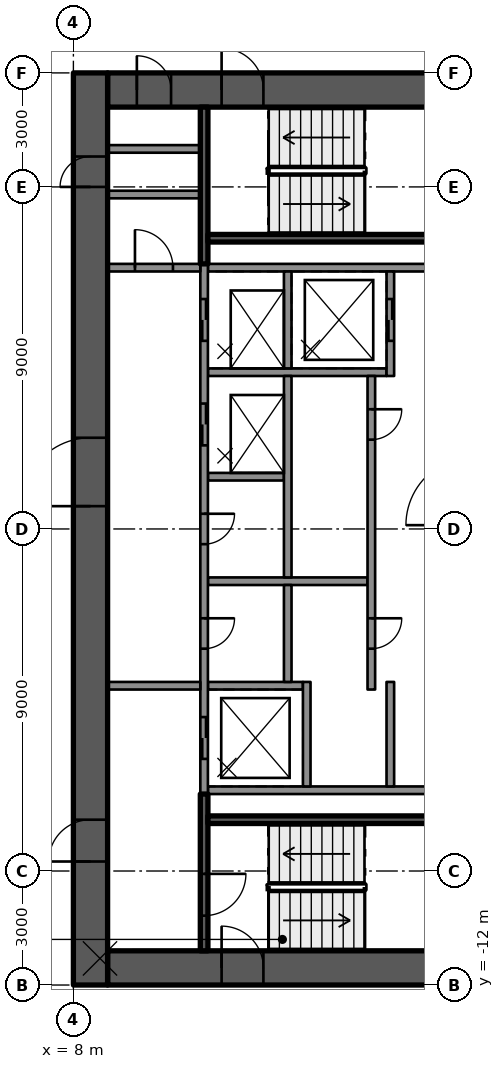
"""IFC4 building model, lengths in metres.
Left out: names, types, materials, properties, quantities, classifications, styles, units other than length and angle.
Written with IfcOpenShell. Run it as: python <this file> out.ifc"""

import sys

from ifc_helpers import new_model, si_unit, direction, frame, frame_2d, origin, place, context, subcontext, project, spatial, rectangle, extrude, element, fill, save


model = new_model("IFC4")
c1 = context("Model", 3, precision=1e-05, world=origin(), true_north=direction((0.0, 1.0)))
c2 = subcontext(c1, "Body", "Model", "MODEL_VIEW")
j1 = project(units=[si_unit("LENGTHUNIT", "METRE"), si_unit("PLANEANGLEUNIT", "RADIAN")], contexts=[c1])
p1 = place(None, origin())
s1 = spatial("IfcSite", under=j1, at=p1, CompositionType="ELEMENT")
p2 = place(p1, origin())
s2 = spatial("IfcBuilding", under=s1, at=p2, CompositionType="ELEMENT")
p3 = place(p2, frame((0.0, 0.0, 275.4)))
s3 = spatial("IfcBuildingStorey", under=s2, at=p3, CompositionType="ELEMENT", Elevation=275.4)
p4 = place(p3, frame((8.9, 11.55, 0.0), z_axis=(0.0, 0.0, 1.0), x_axis=(1.0, 0.0, 0.0)))
e1 = element("IfcWall", 1, at=p4, inside=s3, PredefinedType="SHEAR", context=c2, shape_type="SweptSolid", body=[
    extrude(rectangle(XDim=9.2, YDim=0.9, at=frame_2d((4.6, 0.0))), origin(), (0.0, 0.0, 1.0), 3.5),
])
p5 = place(p4, frame((3.0, 0.0, 0.0)))
e2 = element("IfcOpeningElement", 2, at=p5, cuts=e1, PredefinedType="OPENING", context=c2, shape_type="SweptSolid", body=[
    extrude(rectangle(XDim=1.1, YDim=2.1, at=frame_2d((0.55, 1.05))), frame((0.0, 0.46, 0.0), z_axis=(0.0, -1.0, 0.0), x_axis=(1.0, 0.0, 0.0)), (0.0, 0.0, 1.0), 0.92),
])
p6 = place(p4, frame((0.77, 0.0, 0.0)))
e3 = element("IfcOpeningElement", 3, at=p6, cuts=e1, PredefinedType="OPENING", context=c2, shape_type="SweptSolid", body=[
    extrude(rectangle(XDim=0.9, YDim=2.1, at=frame_2d((0.45, 1.05))), frame((0.0, 0.46, 0.0), z_axis=(0.0, -1.0, 0.0), x_axis=(1.0, 0.0, 0.0)), (0.0, 0.0, 1.0), 0.92),
])
p7 = place(p3, frame((8.9, -11.55, 0.0), z_axis=(0.0, 0.0, 1.0), x_axis=(1.0, 0.0, 0.0)))
e4 = element("IfcWall", 4, at=p7, inside=s3, PredefinedType="SHEAR", context=c2, shape_type="SweptSolid", body=[
    extrude(rectangle(XDim=9.2, YDim=0.9, at=frame_2d((4.6, 0.0))), origin(), (0.0, 0.0, 1.0), 3.5),
])
p8 = place(p7, frame((3.0, 0.0, 0.0)))
e5 = element("IfcOpeningElement", 5, at=p8, cuts=e4, PredefinedType="OPENING", context=c2, shape_type="SweptSolid", body=[
    extrude(rectangle(XDim=1.1, YDim=2.1, at=frame_2d((0.55, 1.05))), frame((0.0, 0.46, 0.0), z_axis=(0.0, -1.0, 0.0), x_axis=(1.0, 0.0, 0.0)), (0.0, 0.0, 1.0), 0.92),
])
p9 = place(p3, frame((8.45, -12.0, 0.0), z_axis=(0.0, 0.0, 1.0), x_axis=(0.0, 1.0, 0.0)))
e6 = element("IfcWall", 6, at=p9, inside=s3, PredefinedType="SHEAR", context=c2, shape_type="SweptSolid", body=[
    extrude(rectangle(XDim=24.0, YDim=0.9, at=frame_2d((12.0, 0.0))), origin(), (0.0, 0.0, 1.0), 3.5),
])
p10 = place(p9, frame((12.6, 0.0, 0.0)))
e7 = element("IfcOpeningElement", 7, at=p10, cuts=e6, PredefinedType="OPENING", context=c2, shape_type="SweptSolid", body=[
    extrude(rectangle(XDim=1.8, YDim=2.1, at=frame_2d((0.9, 1.05))), frame((0.0, 0.46, 0.0), z_axis=(0.0, -1.0, 0.0), x_axis=(1.0, 0.0, 0.0)), (0.0, 0.0, 1.0), 0.92),
])
p11 = place(p9, frame((3.25, 0.0, 0.0)))
e8 = element("IfcOpeningElement", 8, at=p11, cuts=e6, PredefinedType="OPENING", context=c2, shape_type="SweptSolid", body=[
    extrude(rectangle(XDim=1.1, YDim=2.1, at=frame_2d((0.55, 1.05))), frame((0.0, 0.46, 0.0), z_axis=(0.0, -1.0, 0.0), x_axis=(1.0, 0.0, 0.0)), (0.0, 0.0, 1.0), 0.92),
])
p12 = place(p9, frame((21.0, 0.0, 0.0)))
e9 = element("IfcOpeningElement", 9, at=p12, cuts=e6, PredefinedType="OPENING", context=c2, shape_type="SweptSolid", body=[
    extrude(rectangle(XDim=0.8, YDim=2.1, at=frame_2d((0.4, 1.05))), frame((0.0, 0.46, 0.0), z_axis=(0.0, -1.0, 0.0), x_axis=(1.0, 0.0, 0.0)), (0.0, 0.0, 1.0), 0.92),
])
for number, where, z_axis, x_axis in (
    (10, (11.54, -6.875, 0.0), (0.0, 0.0, 1.0), (1.0, 0.0, 0.0)),
    (11, (11.54, 6.875, 0.0), (0.0, 0.0, 1.0), (1.0, 0.0, 0.0)),
):
    element("IfcWall", number, at=place(p3, frame(where, z_axis=z_axis, x_axis=x_axis)), inside=s3, PredefinedType="SOLIDWALL", context=c2, shape_type="SweptSolid", body=[
        extrude(rectangle(XDim=6.56, YDim=0.2, at=frame_2d((3.28, 0.0))), origin(), (0.0, 0.0, 1.0), 3.09),
    ])
p13 = place(p3, frame((11.54, 4.125, 0.0), z_axis=(0.0, 0.0, 1.0), x_axis=(1.0, 0.0, 0.0)))
e12 = element("IfcWall", 12, at=p13, inside=s3, PredefinedType="SOLIDWALL", context=c2, shape_type="SweptSolid", body=[
    extrude(rectangle(XDim=4.7, YDim=0.2, at=frame_2d((2.35, 0.0))), origin(), (0.0, 0.0, 1.0), 3.09),
])
p14 = place(p3, frame((11.54, 1.375, 0.0), z_axis=(0.0, 0.0, 1.0), x_axis=(1.0, 0.0, 0.0)))
e13 = element("IfcWall", 13, at=p14, inside=s3, PredefinedType="SOLIDWALL", context=c2, shape_type="SweptSolid", body=[
    extrude(rectangle(XDim=2.0, YDim=0.2, at=frame_2d((1.0, 0.0))), origin(), (0.0, 0.0, 1.0), 3.09),
])
p15 = place(p3, frame((11.54, -1.375, 0.0), z_axis=(0.0, 0.0, 1.0), x_axis=(1.0, 0.0, 0.0)))
e14 = element("IfcWall", 14, at=p15, inside=s3, PredefinedType="SOLIDWALL", context=c2, shape_type="SweptSolid", body=[
    extrude(rectangle(XDim=4.2, YDim=0.2, at=frame_2d((2.1, 0.0))), origin(), (0.0, 0.0, 1.0), 3.09),
])
p16 = place(p3, frame((11.54, -4.125, 0.0), z_axis=(0.0, 0.0, 1.0), x_axis=(1.0, 0.0, 0.0)))
e15 = element("IfcWall", 15, at=p16, inside=s3, PredefinedType="SOLIDWALL", context=c2, shape_type="SweptSolid", body=[
    extrude(rectangle(XDim=2.5, YDim=0.2, at=frame_2d((1.25, 0.0))), origin(), (0.0, 0.0, 1.0), 3.09),
])
p17 = place(p3, frame((11.44, 6.975, 0.0), z_axis=(0.0, 0.0, 1.0), x_axis=(0.0, -1.0, 0.0)))
e16 = element("IfcWall", 16, at=p17, inside=s3, PredefinedType="SOLIDWALL", context=c2, shape_type="SweptSolid", body=[
    extrude(rectangle(XDim=13.95, YDim=0.2, at=frame_2d((6.975, 0.0))), origin(), (0.0, 0.0, 1.0), 3.09),
])
p18 = place(p17, frame((0.925, 0.0, 0.0)))
e17 = element("IfcOpeningElement", 17, at=p18, cuts=e16, PredefinedType="OPENING", context=c2, shape_type="SweptSolid", body=[
    extrude(rectangle(XDim=1.1, YDim=2.1, at=frame_2d((0.55, 1.05))), frame((0.0, 0.11, 0.0), z_axis=(0.0, -1.0, 0.0), x_axis=(1.0, 0.0, 0.0)), (0.0, 0.0, 1.0), 0.22),
])
p19 = place(p17, frame((3.675, 0.0, 0.0)))
e18 = element("IfcOpeningElement", 18, at=p19, cuts=e16, PredefinedType="OPENING", context=c2, shape_type="SweptSolid", body=[
    extrude(rectangle(XDim=1.1, YDim=2.1, at=frame_2d((0.55, 1.05))), frame((0.0, 0.11, 0.0), z_axis=(0.0, -1.0, 0.0), x_axis=(1.0, 0.0, 0.0)), (0.0, 0.0, 1.0), 0.22),
])
p20 = place(p17, frame((11.925, 0.0, 0.0)))
e19 = element("IfcOpeningElement", 19, at=p20, cuts=e16, PredefinedType="OPENING", context=c2, shape_type="SweptSolid", body=[
    extrude(rectangle(XDim=1.1, YDim=2.1, at=frame_2d((0.55, 1.05))), frame((0.0, 0.11, 0.0), z_axis=(0.0, -1.0, 0.0), x_axis=(1.0, 0.0, 0.0)), (0.0, 0.0, 1.0), 0.22),
])
p21 = place(p17, frame((6.575, 0.0, 0.0)))
e20 = element("IfcOpeningElement", 20, at=p21, cuts=e16, PredefinedType="OPENING", context=c2, shape_type="SweptSolid", body=[
    extrude(rectangle(XDim=0.8, YDim=2.1, at=frame_2d((0.4, 1.05))), frame((0.0, 0.11, 0.0), z_axis=(0.0, -1.0, 0.0), x_axis=(1.0, 0.0, 0.0)), (0.0, 0.0, 1.0), 0.22),
])
p22 = place(p17, frame((9.325, 0.0, 0.0)))
e21 = element("IfcOpeningElement", 21, at=p22, cuts=e16, PredefinedType="OPENING", context=c2, shape_type="SweptSolid", body=[
    extrude(rectangle(XDim=0.8, YDim=2.1, at=frame_2d((0.4, 1.05))), frame((0.0, 0.11, 0.0), z_axis=(0.0, -1.0, 0.0), x_axis=(1.0, 0.0, 0.0)), (0.0, 0.0, 1.0), 0.22),
])
p23 = place(p3, frame((13.64, 6.775, 0.0), z_axis=(0.0, 0.0, 1.0), x_axis=(0.0, -1.0, 0.0)))
e22 = element("IfcWall", 22, at=p23, inside=s3, PredefinedType="SOLIDWALL", context=c2, shape_type="SweptSolid", body=[
    extrude(rectangle(XDim=2.55, YDim=0.2, at=frame_2d((1.275, 0.0))), origin(), (0.0, 0.0, 1.0), 3.09),
])
p24 = place(p3, frame((13.64, 4.025, 0.0), z_axis=(0.0, 0.0, 1.0), x_axis=(0.0, -1.0, 0.0)))
e23 = element("IfcWall", 23, at=p24, inside=s3, PredefinedType="SOLIDWALL", context=c2, shape_type="SweptSolid", body=[
    extrude(rectangle(XDim=5.3, YDim=0.2, at=frame_2d((2.65, 0.0))), origin(), (0.0, 0.0, 1.0), 3.09),
])
p25 = place(p3, frame((13.64, -1.475, 0.0), z_axis=(0.0, 0.0, 1.0), x_axis=(0.0, -1.0, 0.0)))
e24 = element("IfcWall", 24, at=p25, inside=s3, PredefinedType="SOLIDWALL", context=c2, shape_type="SweptSolid", body=[
    extrude(rectangle(XDim=2.55, YDim=0.2, at=frame_2d((1.275, 0.0))), origin(), (0.0, 0.0, 1.0), 3.09),
])
p26 = place(p3, frame((14.14, -4.025, 0.0), z_axis=(0.0, 0.0, 1.0), x_axis=(0.0, -1.0, 0.0)))
e25 = element("IfcWall", 25, at=p26, inside=s3, PredefinedType="SOLIDWALL", context=c2, shape_type="SweptSolid", body=[
    extrude(rectangle(XDim=2.75, YDim=0.2, at=frame_2d((1.375, 0.0))), origin(), (0.0, 0.0, 1.0), 3.09),
])
p27 = place(p3, frame((16.34, 6.775, 0.0), z_axis=(0.0, 0.0, 1.0), x_axis=(0.0, -1.0, 0.0)))
e26 = element("IfcWall", 26, at=p27, inside=s3, PredefinedType="SOLIDWALL", context=c2, shape_type="SweptSolid", body=[
    extrude(rectangle(XDim=2.75, YDim=0.2, at=frame_2d((1.375, 0.0))), origin(), (0.0, 0.0, 1.0), 3.09),
])
p28 = place(p27, frame((0.725, 0.0, 0.0)))
e27 = element("IfcOpeningElement", 27, at=p28, cuts=e26, PredefinedType="OPENING", context=c2, shape_type="SweptSolid", body=[
    extrude(rectangle(XDim=1.1, YDim=2.1, at=frame_2d((0.55, 1.05))), frame((0.0, 0.11, 0.0), z_axis=(0.0, -1.0, 0.0), x_axis=(1.0, 0.0, 0.0)), (0.0, 0.0, 1.0), 0.22),
])
p29 = place(p3, frame((15.84, 4.025, 0.0), z_axis=(0.0, 0.0, 1.0), x_axis=(0.0, -1.0, 0.0)))
e28 = element("IfcWall", 28, at=p29, inside=s3, PredefinedType="SOLIDWALL", context=c2, shape_type="SweptSolid", body=[
    extrude(rectangle(XDim=8.25, YDim=0.2, at=frame_2d((4.125, 0.0))), origin(), (0.0, 0.0, 1.0), 3.09),
])
p30 = place(p29, frame((0.875, 0.0, 0.0)))
e29 = element("IfcOpeningElement", 29, at=p30, cuts=e28, PredefinedType="OPENING", context=c2, shape_type="SweptSolid", body=[
    extrude(rectangle(XDim=0.8, YDim=2.1, at=frame_2d((0.4, 1.05))), frame((0.0, 0.11, 0.0), z_axis=(0.0, -1.0, 0.0), x_axis=(1.0, 0.0, 0.0)), (0.0, 0.0, 1.0), 0.22),
])
p31 = place(p29, frame((6.375, 0.0, 0.0)))
e30 = element("IfcOpeningElement", 30, at=p31, cuts=e28, PredefinedType="OPENING", context=c2, shape_type="SweptSolid", body=[
    extrude(rectangle(XDim=0.8, YDim=2.1, at=frame_2d((0.4, 1.05))), frame((0.0, 0.11, 0.0), z_axis=(0.0, -1.0, 0.0), x_axis=(1.0, 0.0, 0.0)), (0.0, 0.0, 1.0), 0.22),
])
p32 = place(p3, frame((16.34, -4.025, 0.0), z_axis=(0.0, 0.0, 1.0), x_axis=(0.0, -1.0, 0.0)))
e31 = element("IfcWall", 31, at=p32, inside=s3, PredefinedType="SOLIDWALL", context=c2, shape_type="SweptSolid", body=[
    extrude(rectangle(XDim=2.75, YDim=0.2, at=frame_2d((1.375, 0.0))), origin(), (0.0, 0.0, 1.0), 3.09),
])
p33 = place(p3, frame((11.44, -6.975, 0.0), z_axis=(0.0, 0.0, 1.0), x_axis=(0.0, -1.0, 0.0)))
e32 = element("IfcWall", 32, at=p33, inside=s3, PredefinedType="SOLIDWALL", context=c2, shape_type="SweptSolid", body=[
    extrude(rectangle(XDim=4.125, YDim=0.2, at=frame_2d((2.062, 0.0))), origin(), (0.0, 0.0, 1.0), 3.09),
])
p34 = place(p33, frame((2.1, 0.0, 0.0)))
e33 = element("IfcOpeningElement", 33, at=p34, cuts=e32, PredefinedType="OPENING", context=c2, shape_type="SweptSolid", body=[
    extrude(rectangle(XDim=1.1, YDim=2.1, at=frame_2d((0.55, 1.05))), frame((0.0, 0.11, 0.0), z_axis=(0.0, -1.0, 0.0), x_axis=(1.0, 0.0, 0.0)), (0.0, 0.0, 1.0), 0.22),
])
p35 = place(p3, frame((11.54, -7.65, 0.0), z_axis=(0.0, 0.0, 1.0), x_axis=(1.0, 0.0, 0.0)))
e34 = element("IfcWall", 34, at=p35, inside=s3, PredefinedType="SOLIDWALL", context=c2, shape_type="SweptSolid", body=[
    extrude(rectangle(XDim=6.56, YDim=0.2, at=frame_2d((3.28, 0.0))), origin(), (0.0, 0.0, 1.0), 3.09),
])
p36 = place(p3, frame((11.44, 11.1, 0.0), z_axis=(0.0, 0.0, 1.0), x_axis=(0.0, -1.0, 0.0)))
e35 = element("IfcWall", 35, at=p36, inside=s3, PredefinedType="SOLIDWALL", context=c2, shape_type="SweptSolid", body=[
    extrude(rectangle(XDim=4.125, YDim=0.2, at=frame_2d((2.062, 0.0))), origin(), (0.0, 0.0, 1.0), 3.09),
])
p37 = place(p3, frame((11.54, 7.65, 0.0), z_axis=(0.0, 0.0, 1.0), x_axis=(1.0, 0.0, 0.0)))
e36 = element("IfcWall", 36, at=p37, inside=s3, PredefinedType="SOLIDWALL", context=c2, shape_type="SweptSolid", body=[
    extrude(rectangle(XDim=6.56, YDim=0.2, at=frame_2d((3.28, 0.0))), origin(), (0.0, 0.0, 1.0), 3.09),
])
p38 = place(p3, frame((8.9, -4.125, 0.0), z_axis=(0.0, 0.0, 1.0), x_axis=(1.0, 0.0, 0.0)))
e37 = element("IfcWall", 37, at=p38, inside=s3, PredefinedType="PARTITIONING", context=c2, shape_type="SweptSolid", body=[
    extrude(rectangle(XDim=2.44, YDim=0.2, at=frame_2d((1.22, 0.0))), origin(), (0.0, 0.0, 1.0), 3.09),
])
p39 = place(p3, frame((8.9, 6.875, 0.0), z_axis=(0.0, 0.0, 1.0), x_axis=(1.0, 0.0, 0.0)))
e38 = element("IfcWall", 38, at=p39, inside=s3, PredefinedType="PARTITIONING", context=c2, shape_type="SweptSolid", body=[
    extrude(rectangle(XDim=2.44, YDim=0.2, at=frame_2d((1.22, 0.0))), origin(), (0.0, 0.0, 1.0), 3.09),
])
p40 = place(p39, frame((0.72, 0.0, 0.0)))
e39 = element("IfcOpeningElement", 39, at=p40, cuts=e38, PredefinedType="OPENING", context=c2, shape_type="SweptSolid", body=[
    extrude(rectangle(XDim=1.0, YDim=2.1, at=frame_2d((0.5, 1.05))), frame((0.0, 0.11, 0.0), z_axis=(0.0, -1.0, 0.0), x_axis=(1.0, 0.0, 0.0)), (0.0, 0.0, 1.0), 0.22),
])
for number, where, z_axis, x_axis in (
    (40, (8.9, 10.0, 0.0), (0.0, 0.0, 1.0), (1.0, 0.0, 0.0)),
    (41, (8.9, 8.8, 0.0), (0.0, 0.0, 1.0), (1.0, 0.0, 0.0)),
):
    element("IfcWall", number, at=place(p3, frame(where, z_axis=z_axis, x_axis=x_axis)), inside=s3, PredefinedType="PARTITIONING", context=c2, shape_type="SweptSolid", body=[
        extrude(rectangle(XDim=2.44, YDim=0.2, at=frame_2d((1.22, 0.0))), origin(), (0.0, 0.0, 1.0), 3.09),
    ])
p41 = place(p18, origin())
e42 = element("IfcDoor", 42, at=p41, inside=s3, OperationType="DOUBLE_DOOR_SLIDING", PredefinedType="DOOR", context=c2, shape_type="SweptSolid", body=[
    extrude(rectangle(XDim=1.1, YDim=2.1, at=frame_2d((0.55, 1.05))), frame((0.0, 0.025, 0.0), z_axis=(0.0, -1.0, 0.0), x_axis=(1.0, 0.0, 0.0)), (0.0, 0.0, 1.0), 0.05),
])
fill(e17, e42)
p42 = place(p28, origin())
e43 = element("IfcDoor", 43, at=p42, inside=s3, OperationType="DOUBLE_DOOR_SLIDING", PredefinedType="DOOR", context=c2, shape_type="SweptSolid", body=[
    extrude(rectangle(XDim=1.1, YDim=2.1, at=frame_2d((0.55, 1.05))), frame((0.0, 0.025, 0.0), z_axis=(0.0, -1.0, 0.0), x_axis=(1.0, 0.0, 0.0)), (0.0, 0.0, 1.0), 0.05),
])
fill(e27, e43)
p43 = place(p19, origin())
e44 = element("IfcDoor", 44, at=p43, inside=s3, OperationType="DOUBLE_DOOR_SLIDING", PredefinedType="DOOR", context=c2, shape_type="SweptSolid", body=[
    extrude(rectangle(XDim=1.1, YDim=2.1, at=frame_2d((0.55, 1.05))), frame((0.0, 0.025, 0.0), z_axis=(0.0, -1.0, 0.0), x_axis=(1.0, 0.0, 0.0)), (0.0, 0.0, 1.0), 0.05),
])
fill(e18, e44)
p44 = place(p20, origin())
e45 = element("IfcDoor", 45, at=p44, inside=s3, OperationType="DOUBLE_DOOR_SLIDING", PredefinedType="DOOR", context=c2, shape_type="SweptSolid", body=[
    extrude(rectangle(XDim=1.1, YDim=2.1, at=frame_2d((0.55, 1.05))), frame((0.0, 0.025, 0.0), z_axis=(0.0, -1.0, 0.0), x_axis=(1.0, 0.0, 0.0)), (0.0, 0.0, 1.0), 0.05),
])
fill(e19, e45)
p45 = place(p30, origin())
e46 = element("IfcDoor", 46, at=p45, inside=s3, OperationType="SINGLE_SWING_LEFT", PredefinedType="DOOR", context=c2, shape_type="SweptSolid", body=[
    extrude(rectangle(XDim=0.8, YDim=2.1, at=frame_2d((0.4, 1.05))), frame((0.0, 0.025, 0.0), z_axis=(0.0, -1.0, 0.0), x_axis=(1.0, 0.0, 0.0)), (0.0, 0.0, 1.0), 0.05),
])
fill(e29, e46)
p46 = place(p21, origin())
e47 = element("IfcDoor", 47, at=p46, inside=s3, OperationType="SINGLE_SWING_LEFT", PredefinedType="DOOR", context=c2, shape_type="SweptSolid", body=[
    extrude(rectangle(XDim=0.8, YDim=2.1, at=frame_2d((0.4, 1.05))), frame((0.0, 0.025, 0.0), z_axis=(0.0, -1.0, 0.0), x_axis=(1.0, 0.0, 0.0)), (0.0, 0.0, 1.0), 0.05),
])
fill(e20, e47)
p47 = place(p22, origin())
e48 = element("IfcDoor", 48, at=p47, inside=s3, OperationType="SINGLE_SWING_LEFT", PredefinedType="DOOR", context=c2, shape_type="SweptSolid", body=[
    extrude(rectangle(XDim=0.8, YDim=2.1, at=frame_2d((0.4, 1.05))), frame((0.0, 0.025, 0.0), z_axis=(0.0, -1.0, 0.0), x_axis=(1.0, 0.0, 0.0)), (0.0, 0.0, 1.0), 0.05),
])
fill(e21, e48)
p48 = place(p31, origin())
e49 = element("IfcDoor", 49, at=p48, inside=s3, OperationType="SINGLE_SWING_LEFT", PredefinedType="DOOR", context=c2, shape_type="SweptSolid", body=[
    extrude(rectangle(XDim=0.8, YDim=2.1, at=frame_2d((0.4, 1.05))), frame((0.0, 0.025, 0.0), z_axis=(0.0, -1.0, 0.0), x_axis=(1.0, 0.0, 0.0)), (0.0, 0.0, 1.0), 0.05),
])
fill(e30, e49)
p49 = place(p10, origin())
e50 = element("IfcDoor", 50, at=p49, inside=s3, OperationType="SINGLE_SWING_RIGHT", PredefinedType="DOOR", context=c2, shape_type="SweptSolid", body=[
    extrude(rectangle(XDim=1.8, YDim=2.1, at=frame_2d((0.9, 1.05))), frame((0.0, 0.025, 0.0), z_axis=(0.0, -1.0, 0.0), x_axis=(1.0, 0.0, 0.0)), (0.0, 0.0, 1.0), 0.05),
])
fill(e7, e50)
p50 = place(p11, origin())
e51 = element("IfcDoor", 51, at=p50, inside=s3, OperationType="SINGLE_SWING_LEFT", PredefinedType="DOOR", context=c2, shape_type="SweptSolid", body=[
    extrude(rectangle(XDim=1.1, YDim=2.1, at=frame_2d((0.55, 1.05))), frame((0.0, 0.025, 0.0), z_axis=(0.0, -1.0, 0.0), x_axis=(1.0, 0.0, 0.0)), (0.0, 0.0, 1.0), 0.05),
])
fill(e8, e51)
p51 = place(p8, origin())
e52 = element("IfcDoor", 52, at=p51, inside=s3, OperationType="SINGLE_SWING_LEFT", PredefinedType="DOOR", context=c2, shape_type="SweptSolid", body=[
    extrude(rectangle(XDim=1.1, YDim=2.1, at=frame_2d((0.55, 1.05))), frame((0.0, 0.025, 0.0), z_axis=(0.0, -1.0, 0.0), x_axis=(1.0, 0.0, 0.0)), (0.0, 0.0, 1.0), 0.05),
])
fill(e5, e52)
p52 = place(p5, origin())
e53 = element("IfcDoor", 53, at=p52, inside=s3, OperationType="SINGLE_SWING_LEFT", PredefinedType="DOOR", context=c2, shape_type="SweptSolid", body=[
    extrude(rectangle(XDim=1.1, YDim=2.1, at=frame_2d((0.55, 1.05))), frame((0.0, 0.025, 0.0), z_axis=(0.0, -1.0, 0.0), x_axis=(1.0, 0.0, 0.0)), (0.0, 0.0, 1.0), 0.05),
])
fill(e2, e53)
p53 = place(p34, origin())
e54 = element("IfcDoor", 54, at=p53, inside=s3, OperationType="SINGLE_SWING_RIGHT", PredefinedType="DOOR", context=c2, shape_type="SweptSolid", body=[
    extrude(rectangle(XDim=1.1, YDim=2.1, at=frame_2d((0.55, 1.05))), frame((0.0, 0.025, 0.0), z_axis=(0.0, -1.0, 0.0), x_axis=(1.0, 0.0, 0.0)), (0.0, 0.0, 1.0), 0.05),
])
fill(e33, e54)
p54 = place(p6, origin())
e55 = element("IfcDoor", 55, at=p54, inside=s3, OperationType="SINGLE_SWING_LEFT", PredefinedType="DOOR", context=c2, shape_type="SweptSolid", body=[
    extrude(rectangle(XDim=0.9, YDim=2.1, at=frame_2d((0.45, 1.05))), frame((0.0, 0.025, 0.0), z_axis=(0.0, -1.0, 0.0), x_axis=(1.0, 0.0, 0.0)), (0.0, 0.0, 1.0), 0.05),
])
fill(e3, e55)
p55 = place(p12, origin())
e56 = element("IfcDoor", 56, at=p55, inside=s3, OperationType="SINGLE_SWING_RIGHT", PredefinedType="DOOR", context=c2, shape_type="SweptSolid", body=[
    extrude(rectangle(XDim=0.8, YDim=2.1, at=frame_2d((0.4, 1.05))), frame((0.0, 0.025, 0.0), z_axis=(0.0, -1.0, 0.0), x_axis=(1.0, 0.0, 0.0)), (0.0, 0.0, 1.0), 0.05),
])
fill(e9, e56)
p56 = place(p40, origin())
e57 = element("IfcDoor", 57, at=p56, inside=s3, OperationType="SINGLE_SWING_RIGHT", PredefinedType="DOOR", context=c2, shape_type="SweptSolid", body=[
    extrude(rectangle(XDim=1.0, YDim=2.1, at=frame_2d((0.5, 1.05))), frame((0.0, 0.025, 0.0), z_axis=(0.0, -1.0, 0.0), x_axis=(1.0, 0.0, 0.0)), (0.0, 0.0, 1.0), 0.05),
])
fill(e39, e57)
save(model, sys.argv[1])
